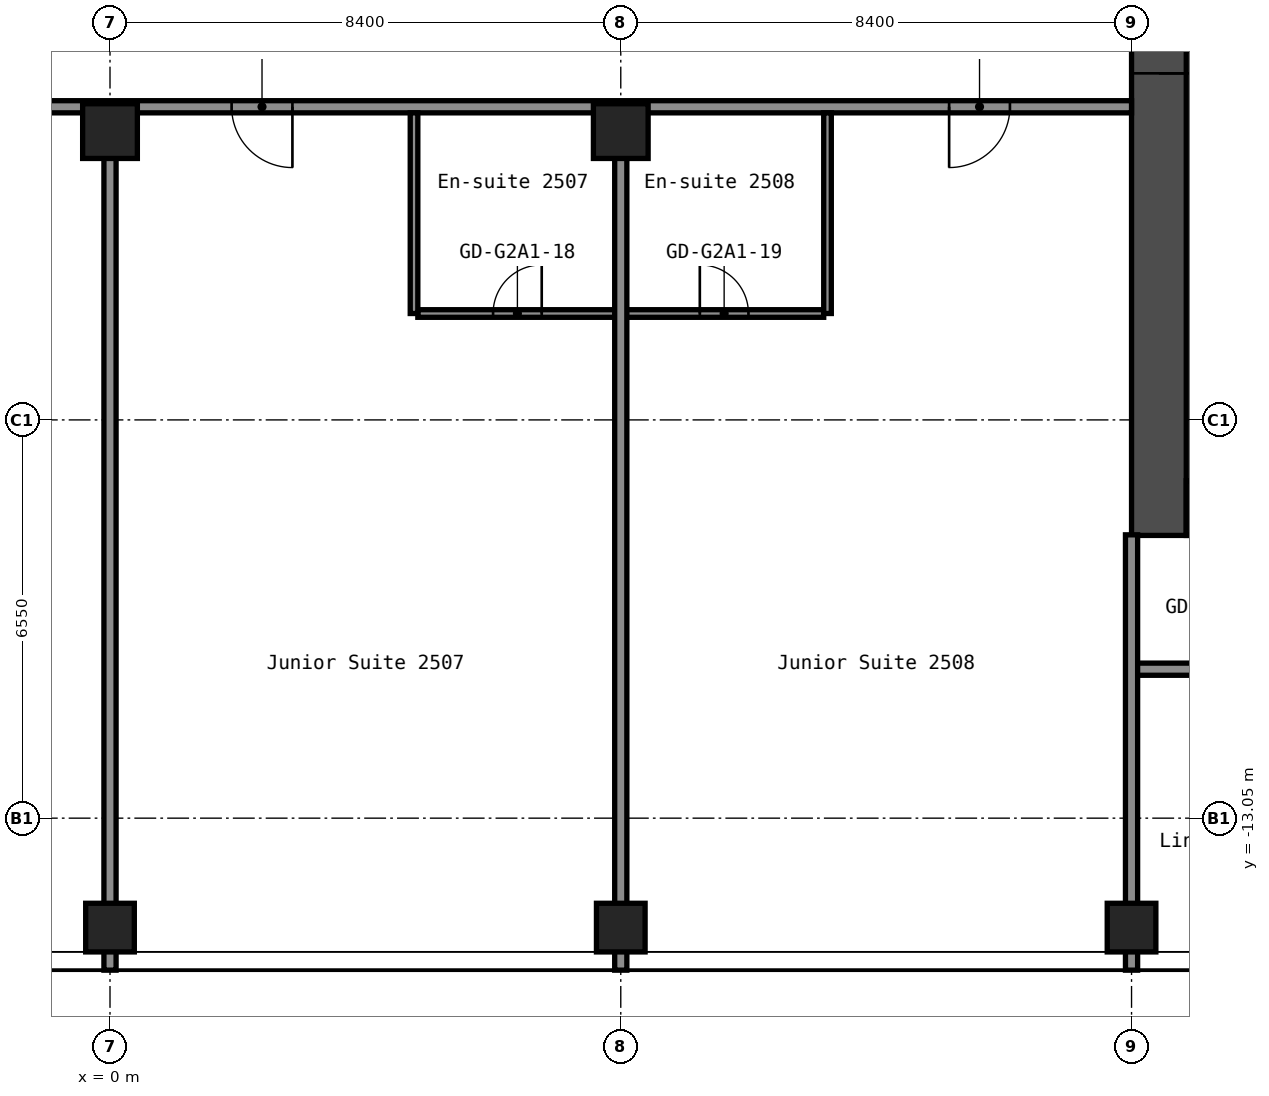
"""IFC4 building model, lengths in metres.
Left out: names, types, materials, properties, quantities, classifications, styles, units other than length and angle.
Written with IfcOpenShell. Run it as: python <this file> out.ifc"""

import sys

from ifc_helpers import new_model, si_unit, direction, frame, frame_2d, origin, origin_2d, place, context, subcontext, project, spatial, rectangle, hollow_rectangle, extrude, element, fill, save


model = new_model("IFC4")
c1 = context("Model", 3, precision=1e-05, world=origin(), true_north=direction((0.0, 1.0)))
c2 = subcontext(c1, "Body", "Model", "MODEL_VIEW")
j1 = project(units=[si_unit("LENGTHUNIT", "METRE"), si_unit("PLANEANGLEUNIT", "RADIAN")], contexts=[c1])
p1 = place(None, origin())
s1 = spatial("IfcSite", under=j1, at=p1, CompositionType="ELEMENT")
p2 = place(p1, origin())
s2 = spatial("IfcBuilding", under=s1, at=p2, CompositionType="ELEMENT")
p3 = place(p2, frame((0.0, 0.0, 91.4)))
s3 = spatial("IfcBuildingStorey", under=s2, at=p3, CompositionType="ELEMENT", Elevation=91.4)
p4 = place(p3, frame((0.0, -14.85, 0.0), z_axis=(0.0, 0.0, 1.0), x_axis=(1.0, 0.0, 0.0)))
e1 = element("IfcColumn", 1, at=p4, inside=s3, PredefinedType="COLUMN", context=c2, shape_type="SweptSolid", body=[
    extrude(hollow_rectangle(XDim=0.8, YDim=0.8, WallThickness=0.032, at=origin_2d()), origin(), (0.0, 0.0, 1.0), 2.8),
])
p5 = place(p3, frame((0.0, -1.75, 0.0), z_axis=(0.0, 0.0, 1.0), x_axis=(1.0, 0.0, 0.0)))
e2 = element("IfcColumn", 2, at=p5, inside=s3, PredefinedType="COLUMN", context=c2, shape_type="SweptSolid", body=[
    extrude(hollow_rectangle(XDim=0.9, YDim=0.9, WallThickness=0.036, at=origin_2d()), origin(), (0.0, 0.0, 1.0), 2.8),
])
p6 = place(p3, frame((8.4, -14.85, 0.0), z_axis=(0.0, 0.0, 1.0), x_axis=(1.0, 0.0, 0.0)))
e3 = element("IfcColumn", 3, at=p6, inside=s3, PredefinedType="COLUMN", context=c2, shape_type="SweptSolid", body=[
    extrude(hollow_rectangle(XDim=0.8, YDim=0.8, WallThickness=0.032, at=origin_2d()), origin(), (0.0, 0.0, 1.0), 2.8),
])
p7 = place(p3, frame((8.4, -1.75, 0.0), z_axis=(0.0, 0.0, 1.0), x_axis=(1.0, 0.0, 0.0)))
e4 = element("IfcColumn", 4, at=p7, inside=s3, PredefinedType="COLUMN", context=c2, shape_type="SweptSolid", body=[
    extrude(hollow_rectangle(XDim=0.9, YDim=0.9, WallThickness=0.036, at=origin_2d()), origin(), (0.0, 0.0, 1.0), 2.8),
])
p8 = place(p3, frame((16.8, -14.85, 0.0), z_axis=(0.0, 0.0, 1.0), x_axis=(1.0, 0.0, 0.0)))
e5 = element("IfcColumn", 5, at=p8, inside=s3, PredefinedType="COLUMN", context=c2, shape_type="SweptSolid", body=[
    extrude(hollow_rectangle(XDim=0.8, YDim=0.8, WallThickness=0.032, at=origin_2d()), origin(), (0.0, 0.0, 1.0), 2.8),
])
p9 = place(p3, frame((17.25, -8.4, 0.0), z_axis=(0.0, 0.0, 1.0), x_axis=(0.0, 1.0, 0.0)))
e6 = element("IfcWall", 6, at=p9, inside=s3, PredefinedType="SHEAR", context=c2, shape_type="SweptSolid", body=[
    extrude(rectangle(XDim=16.8, YDim=0.9, at=frame_2d((8.4, 0.0))), origin(), (0.0, 0.0, 1.0), 2.8),
])
p10 = place(p9, frame((7.6, 0.0, 0.0)))
e7 = element("IfcOpeningElement", 7, at=p10, cuts=e6, PredefinedType="OPENING", context=c2, shape_type="SweptSolid", body=[
    extrude(rectangle(XDim=1.2, YDim=2.1, at=frame_2d((0.6, 1.05))), frame((0.0, 0.46, 0.0), z_axis=(0.0, -1.0, 0.0), x_axis=(1.0, 0.0, 0.0)), (0.0, 0.0, 1.0), 0.92),
])
p11 = place(p3, frame((17.7, -7.95, 0.0), z_axis=(0.0, 0.0, 1.0), x_axis=(1.0, 0.0, 0.0)))
e8 = element("IfcWall", 8, at=p11, inside=s3, PredefinedType="SHEAR", context=c2, shape_type="SweptSolid", body=[
    extrude(rectangle(XDim=15.0, YDim=0.9, at=frame_2d((7.5, 0.0))), origin(), (0.0, 0.0, 1.0), 2.8),
])
p12 = place(p11, frame((2.55, 0.0, 0.0)))
e9 = element("IfcOpeningElement", 9, at=p12, cuts=e8, PredefinedType="OPENING", context=c2, shape_type="SweptSolid", body=[
    extrude(rectangle(XDim=1.0, YDim=2.1, at=frame_2d((0.5, 1.05))), frame((0.0, 0.46, 0.0), z_axis=(0.0, -1.0, 0.0), x_axis=(1.0, 0.0, 0.0)), (0.0, 0.0, 1.0), 0.92),
])
p13 = place(p3, frame((16.8, -10.6, 0.0), z_axis=(0.0, 0.0, 1.0), x_axis=(1.0, 0.0, 0.0)))
e10 = element("IfcWall", 10, at=p13, inside=s3, PredefinedType="PARTITIONING", context=c2, shape_type="SweptSolid", body=[
    extrude(rectangle(XDim=29.7, YDim=0.2, at=frame_2d((14.85, 0.0))), origin(), (0.0, 0.0, 1.0), 2.8),
])
p14 = place(p13, frame((1.06, 0.0, 0.0)))
e11 = element("IfcOpeningElement", 11, at=p14, cuts=e10, PredefinedType="OPENING", context=c2, shape_type="SweptSolid", body=[
    extrude(rectangle(XDim=0.9, YDim=2.1, at=frame_2d((0.45, 1.05))), frame((0.0, 0.11, 0.0), z_axis=(0.0, -1.0, 0.0), x_axis=(1.0, 0.0, 0.0)), (0.0, 0.0, 1.0), 0.22),
])
p15 = place(p13, frame((5.26, 0.0, 0.0)))
e12 = element("IfcOpeningElement", 12, at=p15, cuts=e10, PredefinedType="OPENING", context=c2, shape_type="SweptSolid", body=[
    extrude(rectangle(XDim=0.9, YDim=2.1, at=frame_2d((0.45, 1.05))), frame((0.0, 0.11, 0.0), z_axis=(0.0, -1.0, 0.0), x_axis=(1.0, 0.0, 0.0)), (0.0, 0.0, 1.0), 0.22),
])
p16 = place(p13, frame((9.63, 0.0, 0.0)))
e13 = element("IfcOpeningElement", 13, at=p16, cuts=e10, PredefinedType="OPENING", context=c2, shape_type="SweptSolid", body=[
    extrude(rectangle(XDim=0.9, YDim=2.1, at=frame_2d((0.45, 1.05))), frame((0.0, 0.11, 0.0), z_axis=(0.0, -1.0, 0.0), x_axis=(1.0, 0.0, 0.0)), (0.0, 0.0, 1.0), 0.22),
])
p17 = place(p13, frame((13.83, 0.0, 0.0)))
e14 = element("IfcOpeningElement", 14, at=p17, cuts=e10, PredefinedType="OPENING", context=c2, shape_type="SweptSolid", body=[
    extrude(rectangle(XDim=0.9, YDim=2.1, at=frame_2d((0.45, 1.05))), frame((0.0, 0.11, 0.0), z_axis=(0.0, -1.0, 0.0), x_axis=(1.0, 0.0, 0.0)), (0.0, 0.0, 1.0), 0.22),
])
p18 = place(p13, frame((18.115, 0.0, 0.0)))
e15 = element("IfcOpeningElement", 15, at=p18, cuts=e10, PredefinedType="OPENING", context=c2, shape_type="SweptSolid", body=[
    extrude(rectangle(XDim=0.9, YDim=2.1, at=frame_2d((0.45, 1.05))), frame((0.0, 0.11, 0.0), z_axis=(0.0, -1.0, 0.0), x_axis=(1.0, 0.0, 0.0)), (0.0, 0.0, 1.0), 0.22),
])
p19 = place(p13, frame((22.315, 0.0, 0.0)))
e16 = element("IfcOpeningElement", 16, at=p19, cuts=e10, PredefinedType="OPENING", context=c2, shape_type="SweptSolid", body=[
    extrude(rectangle(XDim=0.9, YDim=2.1, at=frame_2d((0.45, 1.05))), frame((0.0, 0.11, 0.0), z_axis=(0.0, -1.0, 0.0), x_axis=(1.0, 0.0, 0.0)), (0.0, 0.0, 1.0), 0.22),
])
p20 = place(p13, frame((26.85, 0.0, 0.0)))
e17 = element("IfcOpeningElement", 17, at=p20, cuts=e10, PredefinedType="OPENING", context=c2, shape_type="SweptSolid", body=[
    extrude(rectangle(XDim=0.9, YDim=2.1, at=frame_2d((0.45, 1.05))), frame((0.0, 0.11, 0.0), z_axis=(0.0, -1.0, 0.0), x_axis=(1.0, 0.0, 0.0)), (0.0, 0.0, 1.0), 0.22),
])
p21 = place(p3, frame((5.062, -4.75, 0.0), z_axis=(0.0, 0.0, 1.0), x_axis=(1.0, 0.0, 0.0)))
e18 = element("IfcWall", 18, at=p21, inside=s3, PredefinedType="PARTITIONING", context=c2, shape_type="SweptSolid", body=[
    extrude(rectangle(XDim=6.675, YDim=0.125, at=frame_2d((3.337, 0.0))), origin(), (0.0, 0.0, 1.0), 2.8),
])
p22 = place(p21, frame((1.238, 0.0, 0.0)))
e19 = element("IfcOpeningElement", 19, at=p22, cuts=e18, PredefinedType="OPENING", context=c2, shape_type="SweptSolid", body=[
    extrude(rectangle(XDim=0.8, YDim=2.1, at=frame_2d((0.4, 1.05))), frame((0.0, 0.073, 0.0), z_axis=(0.0, -1.0, 0.0), x_axis=(1.0, 0.0, 0.0)), (0.0, 0.0, 1.0), 0.145),
])
p23 = place(p21, frame((4.637, 0.0, 0.0)))
e20 = element("IfcOpeningElement", 20, at=p23, cuts=e18, PredefinedType="OPENING", context=c2, shape_type="SweptSolid", body=[
    extrude(rectangle(XDim=0.8, YDim=2.1, at=frame_2d((0.4, 1.05))), frame((0.0, 0.073, 0.0), z_axis=(0.0, -1.0, 0.0), x_axis=(1.0, 0.0, 0.0)), (0.0, 0.0, 1.0), 0.145),
])
p24 = place(p3, frame((-16.8, -1.35, 0.0), z_axis=(0.0, 0.0, 1.0), x_axis=(1.0, 0.0, 0.0)))
e21 = element("IfcWall", 21, at=p24, inside=s3, PredefinedType="PARTITIONING", context=c2, shape_type="SweptSolid", body=[
    extrude(rectangle(XDim=33.6, YDim=0.2, at=frame_2d((16.8, 0.0))), origin(), (0.0, 0.0, 1.0), 2.8),
])
p25 = place(p24, frame((2.0, 0.0, 0.0)))
e22 = element("IfcOpeningElement", 22, at=p25, cuts=e21, PredefinedType="OPENING", context=c2, shape_type="SweptSolid", body=[
    extrude(rectangle(XDim=1.0, YDim=2.1, at=frame_2d((0.5, 1.05))), frame((0.0, 0.11, 0.0), z_axis=(0.0, -1.0, 0.0), x_axis=(1.0, 0.0, 0.0)), (0.0, 0.0, 1.0), 0.22),
])
p26 = place(p24, frame((9.545, 0.0, 0.0)))
e23 = element("IfcOpeningElement", 23, at=p26, cuts=e21, PredefinedType="OPENING", context=c2, shape_type="SweptSolid", body=[
    extrude(rectangle(XDim=0.9, YDim=2.1, at=frame_2d((0.45, 1.05))), frame((0.0, 0.11, 0.0), z_axis=(0.0, -1.0, 0.0), x_axis=(1.0, 0.0, 0.0)), (0.0, 0.0, 1.0), 0.22),
])
p27 = place(p24, frame((13.745, 0.0, 0.0)))
e24 = element("IfcOpeningElement", 24, at=p27, cuts=e21, PredefinedType="OPENING", context=c2, shape_type="SweptSolid", body=[
    extrude(rectangle(XDim=0.9, YDim=2.1, at=frame_2d((0.45, 1.05))), frame((0.0, 0.11, 0.0), z_axis=(0.0, -1.0, 0.0), x_axis=(1.0, 0.0, 0.0)), (0.0, 0.0, 1.0), 0.22),
])
p28 = place(p24, frame((18.8, 0.0, 0.0)))
e25 = element("IfcOpeningElement", 25, at=p28, cuts=e21, PredefinedType="OPENING", context=c2, shape_type="SweptSolid", body=[
    extrude(rectangle(XDim=1.0, YDim=2.1, at=frame_2d((0.5, 1.05))), frame((0.0, 0.11, 0.0), z_axis=(0.0, -1.0, 0.0), x_axis=(1.0, 0.0, 0.0)), (0.0, 0.0, 1.0), 0.22),
])
p29 = place(p24, frame((30.6, 0.0, 0.0)))
e26 = element("IfcOpeningElement", 26, at=p29, cuts=e21, PredefinedType="OPENING", context=c2, shape_type="SweptSolid", body=[
    extrude(rectangle(XDim=1.0, YDim=2.1, at=frame_2d((0.5, 1.05))), frame((0.0, 0.11, 0.0), z_axis=(0.0, -1.0, 0.0), x_axis=(1.0, 0.0, 0.0)), (0.0, 0.0, 1.0), 0.22),
])
p30 = place(p3, frame((0.0, -15.55, 0.0), z_axis=(0.0, 0.0, 1.0), x_axis=(0.0, 1.0, 0.0)))
e27 = element("IfcWall", 27, at=p30, inside=s3, PredefinedType="PARTITIONING", context=c2, shape_type="SweptSolid", body=[
    extrude(rectangle(XDim=13.36, YDim=0.2, at=frame_2d((6.68, 0.0))), origin(), (0.0, 0.0, 1.0), 2.8),
])
p31 = place(p3, frame((5.0, -4.75, 0.0), z_axis=(0.0, 0.0, 1.0), x_axis=(0.0, 1.0, 0.0)))
e28 = element("IfcWall", 28, at=p31, inside=s3, PredefinedType="PARTITIONING", context=c2, shape_type="SweptSolid", body=[
    extrude(rectangle(XDim=3.3, YDim=0.125, at=frame_2d((1.65, 0.0))), origin(), (0.0, 0.0, 1.0), 2.8),
])
p32 = place(p3, frame((8.4, -15.55, 0.0), z_axis=(0.0, 0.0, 1.0), x_axis=(0.0, 1.0, 0.0)))
e29 = element("IfcWall", 29, at=p32, inside=s3, PredefinedType="PARTITIONING", context=c2, shape_type="SweptSolid", body=[
    extrude(rectangle(XDim=13.36, YDim=0.2, at=frame_2d((6.68, 0.0))), origin(), (0.0, 0.0, 1.0), 2.8),
])
p33 = place(p3, frame((11.8, -4.75, 0.0), z_axis=(0.0, 0.0, 1.0), x_axis=(0.0, 1.0, 0.0)))
e30 = element("IfcWall", 30, at=p33, inside=s3, PredefinedType="PARTITIONING", context=c2, shape_type="SweptSolid", body=[
    extrude(rectangle(XDim=3.3, YDim=0.125, at=frame_2d((1.65, 0.0))), origin(), (0.0, 0.0, 1.0), 2.8),
])
p34 = place(p3, frame((16.8, -15.55, 0.0), z_axis=(0.0, 0.0, 1.0), x_axis=(0.0, 1.0, 0.0)))
e31 = element("IfcWall", 31, at=p34, inside=s3, PredefinedType="PARTITIONING", context=c2, shape_type="SweptSolid", body=[
    extrude(rectangle(XDim=7.16, YDim=0.2, at=frame_2d((3.58, 0.0))), origin(), (0.0, 0.0, 1.0), 2.8),
])
p35 = place(p10, origin())
e32 = element("IfcDoor", 32, at=p35, inside=s3, OperationType="DOUBLE_DOOR_SINGLE_SWING", PredefinedType="DOOR", context=c2, shape_type="SweptSolid", body=[
    extrude(rectangle(XDim=1.2, YDim=2.1, at=frame_2d((0.6, 1.05))), frame((0.0, 0.025, 0.0), z_axis=(0.0, -1.0, 0.0), x_axis=(1.0, 0.0, 0.0)), (0.0, 0.0, 1.0), 0.05),
])
fill(e7, e32)
p36 = place(p22, origin())
e33 = element("IfcDoor", 33, at=p36, inside=s3, OperationType="SINGLE_SWING_LEFT", PredefinedType="DOOR", context=c2, shape_type="SweptSolid", body=[
    extrude(rectangle(XDim=0.8, YDim=2.1, at=frame_2d((0.4, 1.05))), frame((0.0, 0.025, 0.0), z_axis=(0.0, -1.0, 0.0), x_axis=(1.0, 0.0, 0.0)), (0.0, 0.0, 1.0), 0.05),
])
fill(e19, e33)
p37 = place(p23, origin())
e34 = element("IfcDoor", 34, at=p37, inside=s3, OperationType="SINGLE_SWING_RIGHT", PredefinedType="DOOR", context=c2, shape_type="SweptSolid", body=[
    extrude(rectangle(XDim=0.8, YDim=2.1, at=frame_2d((0.4, 1.05))), frame((0.0, 0.025, 0.0), z_axis=(0.0, -1.0, 0.0), x_axis=(1.0, 0.0, 0.0)), (0.0, 0.0, 1.0), 0.05),
])
fill(e20, e34)
p38 = place(p28, origin())
e35 = element("IfcDoor", 35, at=p38, inside=s3, OperationType="SINGLE_SWING_RIGHT", PredefinedType="DOOR", context=c2, shape_type="SweptSolid", body=[
    extrude(rectangle(XDim=1.0, YDim=2.1, at=frame_2d((0.5, 1.05))), frame((0.0, 0.025, 0.0), z_axis=(0.0, -1.0, 0.0), x_axis=(1.0, 0.0, 0.0)), (0.0, 0.0, 1.0), 0.05),
])
fill(e25, e35)
p39 = place(p29, origin())
e36 = element("IfcDoor", 36, at=p39, inside=s3, OperationType="SINGLE_SWING_LEFT", PredefinedType="DOOR", context=c2, shape_type="SweptSolid", body=[
    extrude(rectangle(XDim=1.0, YDim=2.1, at=frame_2d((0.5, 1.05))), frame((0.0, 0.025, 0.0), z_axis=(0.0, -1.0, 0.0), x_axis=(1.0, 0.0, 0.0)), (0.0, 0.0, 1.0), 0.05),
])
fill(e26, e36)
save(model, sys.argv[1])
